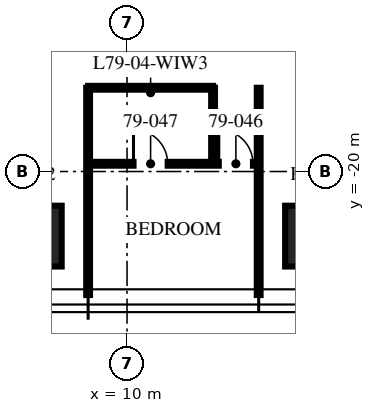
"""IFC4 building model, lengths in metres.
Left out: names, types, materials, properties, quantities, classifications, styles, units other than length and angle.
Written with IfcOpenShell. Run it as: python <this file> out.ifc"""

import sys

from ifc_helpers import new_model, si_unit, direction, frame, frame_2d, origin, origin_2d, place, context, subcontext, project, spatial, rectangle, extrude, element, fill, save


model = new_model("IFC4")
c1 = context("Model", 3, precision=1e-05, world=origin(), true_north=direction((0.0, 1.0)))
c2 = subcontext(c1, "Body", "Model", "MODEL_VIEW")
j1 = project(units=[si_unit("LENGTHUNIT", "METRE"), si_unit("PLANEANGLEUNIT", "RADIAN")], contexts=[c1])
p1 = place(None, origin())
s1 = spatial("IfcSite", under=j1, at=p1, CompositionType="ELEMENT")
p2 = place(p1, origin())
s2 = spatial("IfcBuilding", under=s1, at=p2, CompositionType="ELEMENT")
p3 = place(p2, frame((0.0, 0.0, 315.75)))
s3 = spatial("IfcBuildingStorey", under=s2, at=p3, CompositionType="ELEMENT", Elevation=315.75)
for number, where, z_axis, x_axis in (
    (1, (14.96, -21.7, 0.0), (0.0, 0.0, 1.0), (1.0, 0.0, 0.0)),
    (2, (7.48, -21.7, 0.0), (0.0, 0.0, 1.0), (1.0, 0.0, 0.0)),
):
    element("IfcColumn", number, at=place(p3, frame(where, z_axis=z_axis, x_axis=x_axis)), inside=s3, PredefinedType="COLUMN", context=c2, shape_type="SweptSolid", body=[
        extrude(rectangle(XDim=1.6, YDim=1.6, at=origin_2d()), origin(), (0.0, 0.0, 1.0), 3.75),
    ])
for number, where, z_axis, x_axis in (
    (3, (8.976, -17.796, 0.0), (0.0, 0.0, 1.0), (0.0, -1.0, 0.0)),
    (4, (13.464, -17.796, 0.0), (0.0, 0.0, 1.0), (0.0, -1.0, 0.0)),
):
    element("IfcWall", number, at=place(p3, frame(where, z_axis=z_axis, x_axis=x_axis)), inside=s3, PredefinedType="PARTITIONING", context=c2, shape_type="SweptSolid", body=[
        extrude(rectangle(XDim=5.454, YDim=0.1, at=frame_2d((2.727, 0.0))), origin(), (0.0, 0.0, 1.0), 3.01),
    ])
p4 = place(p3, frame((8.976, -19.796, 0.0), z_axis=(0.0, 0.0, 1.0), x_axis=(1.0, 0.0, 0.0)))
e5 = element("IfcWall", 5, at=p4, inside=s3, PredefinedType="PARTITIONING", context=c2, shape_type="SweptSolid", body=[
    extrude(rectangle(XDim=4.488, YDim=0.1, at=frame_2d((2.244, 0.0))), origin(), (0.0, 0.0, 1.0), 2.91),
])
p5 = place(p4, frame((3.438, 0.0, 0.0)))
e6 = element("IfcOpeningElement", 6, at=p5, cuts=e5, PredefinedType="OPENING", context=c2, shape_type="SweptSolid", body=[
    extrude(rectangle(XDim=0.9, YDim=2.1, at=frame_2d((0.45, 1.05))), frame((0.0, 0.06, 0.0), z_axis=(0.0, -1.0, 0.0), x_axis=(1.0, 0.0, 0.0)), (0.0, 0.0, 1.0), 0.12),
])
p6 = place(p4, frame((1.194, 0.0, 0.0)))
e7 = element("IfcOpeningElement", 7, at=p6, cuts=e5, PredefinedType="OPENING", context=c2, shape_type="SweptSolid", body=[
    extrude(rectangle(XDim=0.9, YDim=2.1, at=frame_2d((0.45, 1.05))), frame((0.0, 0.06, 0.0), z_axis=(0.0, -1.0, 0.0), x_axis=(1.0, 0.0, 0.0)), (0.0, 0.0, 1.0), 0.12),
])
p7 = place(p3, frame((12.264, -17.796, 0.0), z_axis=(0.0, 0.0, 1.0), x_axis=(0.0, -1.0, 0.0)))
e8 = element("IfcWall", 8, at=p7, inside=s3, PredefinedType="PARTITIONING", context=c2, shape_type="SweptSolid", body=[
    extrude(rectangle(XDim=2.0, YDim=0.1, at=frame_2d((1.0, 0.0))), origin(), (0.0, 0.0, 1.0), 3.5),
])
p8 = place(p3, frame((8.976, -17.796, 0.0), z_axis=(0.0, 0.0, 1.0), x_axis=(1.0, 0.0, 0.0)))
e9 = element("IfcWall", 9, at=p8, inside=s3, PredefinedType="PARTITIONING", context=c2, shape_type="SweptSolid", body=[
    extrude(rectangle(XDim=3.288, YDim=0.1, at=frame_2d((1.644, 0.0))), origin(), (0.0, 0.0, 1.0), 2.91),
])
p9 = place(p5, origin())
e10 = element("IfcDoor", 10, at=p9, inside=s3, OperationType="SINGLE_SWING_LEFT", PredefinedType="DOOR", context=c2, shape_type="SweptSolid", body=[
    extrude(rectangle(XDim=0.9, YDim=2.1, at=frame_2d((0.45, 1.05))), frame((0.0, 0.025, 0.0), z_axis=(0.0, -1.0, 0.0), x_axis=(1.0, 0.0, 0.0)), (0.0, 0.0, 1.0), 0.05),
])
fill(e6, e10)
p10 = place(p6, origin())
e11 = element("IfcDoor", 11, at=p10, inside=s3, OperationType="SINGLE_SWING_LEFT", PredefinedType="DOOR", context=c2, shape_type="SweptSolid", body=[
    extrude(rectangle(XDim=0.9, YDim=2.1, at=frame_2d((0.45, 1.05))), frame((0.0, 0.025, 0.0), z_axis=(0.0, -1.0, 0.0), x_axis=(1.0, 0.0, 0.0)), (0.0, 0.0, 1.0), 0.05),
])
fill(e7, e11)
save(model, sys.argv[1])
